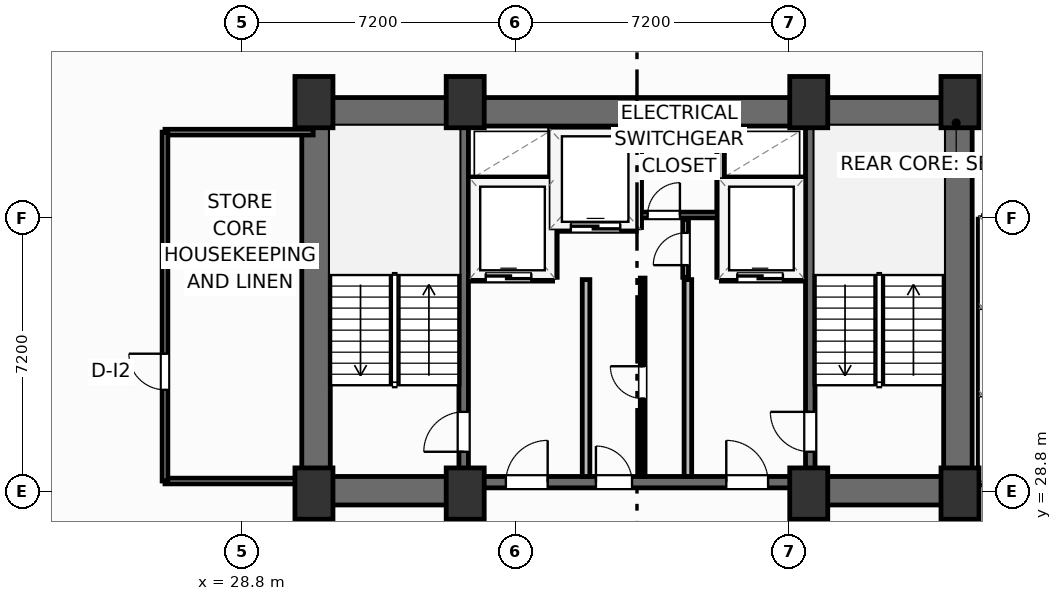
"""IFC4 building model, lengths in metres.
Left out: names, types, materials, properties, quantities, classifications, styles, units other than length and angle.
Written with IfcOpenShell. Run it as: python <this file> out.ifc"""

import sys

from ifc_helpers import new_model, si_unit, direction, frame, frame_2d, origin, origin_2d, place, context, subcontext, project, spatial, rectangle, extrude, element, fill, save


model = new_model("IFC4")
c1 = context("Model", 3, precision=1e-05, world=origin(), true_north=direction((0.0, 1.0)))
c2 = subcontext(c1, "Body", "Model", "MODEL_VIEW")
j1 = project(units=[si_unit("LENGTHUNIT", "METRE"), si_unit("PLANEANGLEUNIT", "RADIAN")], contexts=[c1])
p1 = place(None, origin())
s1 = spatial("IfcSite", under=j1, at=p1, CompositionType="ELEMENT")
p2 = place(p1, origin())
s2 = spatial("IfcBuilding", under=s1, at=p2, CompositionType="ELEMENT")
p3 = place(p2, frame((0.0, 0.0, 136.5)))
s3 = spatial("IfcBuildingStorey", under=s2, at=p3, CompositionType="ELEMENT", Elevation=136.5)
for number, where, z_axis, x_axis in (
    (1, (30.7, 28.75, 0.0), (0.0, 0.0, 1.0), (1.0, 0.0, 0.0)),
    (2, (34.68, 28.75, 0.0), (0.0, 0.0, 1.0), (1.0, 0.0, 0.0)),
    (3, (43.72, 28.75, 0.0), (0.0, 0.0, 1.0), (1.0, 0.0, 0.0)),
    (4, (47.7, 28.75, 0.0), (0.0, 0.0, 1.0), (1.0, 0.0, 0.0)),
    (5, (30.7, 39.05, 0.0), (0.0, 0.0, 1.0), (1.0, 0.0, 0.0)),
    (6, (34.68, 39.05, 0.0), (0.0, 0.0, 1.0), (1.0, 0.0, 0.0)),
    (7, (43.72, 39.05, 0.0), (0.0, 0.0, 1.0), (1.0, 0.0, 0.0)),
    (8, (47.7, 39.05, 0.0), (0.0, 0.0, 1.0), (1.0, 0.0, 0.0)),
):
    element("IfcColumn", number, at=place(p3, frame(where, z_axis=z_axis, x_axis=x_axis)), inside=s3, PredefinedType="COLUMN", context=c2, shape_type="SweptSolid", body=[
        extrude(rectangle(XDim=1.0, YDim=1.35, at=origin_2d()), origin(), (0.0, 0.0, 1.0), 3.7),
    ])
p4 = place(p3, frame((30.38, 38.795, 0.0), z_axis=(0.0, 0.0, 1.0), x_axis=(1.0, 0.0, 0.0)))
e9 = element("IfcWall", 9, at=p4, inside=s3, PredefinedType="SHEAR", context=c2, shape_type="SweptSolid", body=[
    extrude(rectangle(XDim=17.64, YDim=0.75, at=frame_2d((8.82, 0.0))), origin(), (0.0, 0.0, 1.0), 3.45),
])
for number, where, z_axis, x_axis in (
    (10, (30.755, 29.2, 0.0), (0.0, 0.0, 1.0), (0.0, 1.0, 0.0)),
    (11, (47.645, 29.2, 0.0), (0.0, 0.0, 1.0), (0.0, 1.0, 0.0)),
):
    element("IfcWall", number, at=place(p3, frame(where, z_axis=z_axis, x_axis=x_axis)), inside=s3, PredefinedType="SHEAR", context=c2, shape_type="SweptSolid", body=[
        extrude(rectangle(XDim=9.22, YDim=0.75, at=frame_2d((4.61, 0.0))), origin(), (0.0, 0.0, 1.0), 3.45),
    ])
p5 = place(p3, frame((30.38, 28.825, 0.0), z_axis=(0.0, 0.0, 1.0), x_axis=(1.0, 0.0, 0.0)))
e12 = element("IfcWall", 12, at=p5, inside=s3, PredefinedType="SHEAR", context=c2, shape_type="SweptSolid", body=[
    extrude(rectangle(XDim=4.42, YDim=0.75, at=frame_2d((2.21, 0.0))), origin(), (0.0, 0.0, 1.0), 3.45),
])
p6 = place(p3, frame((43.6, 28.825, 0.0), z_axis=(0.0, 0.0, 1.0), x_axis=(1.0, 0.0, 0.0)))
e13 = element("IfcWall", 13, at=p6, inside=s3, PredefinedType="SHEAR", context=c2, shape_type="SweptSolid", body=[
    extrude(rectangle(XDim=4.42, YDim=0.75, at=frame_2d((2.21, 0.0))), origin(), (0.0, 0.0, 1.0), 3.45),
])
p7 = place(p3, frame((34.8, 29.05, 0.0), z_axis=(0.0, 0.0, 1.0), x_axis=(1.0, 0.0, 0.0)))
e14 = element("IfcWall", 14, at=p7, inside=s3, PredefinedType="SHEAR", context=c2, shape_type="SweptSolid", body=[
    extrude(rectangle(XDim=8.8, YDim=0.3, at=frame_2d((4.4, 0.0))), origin(), (0.0, 0.0, 1.0), 3.45),
])
p8 = place(p7, frame((0.95, 0.0, 0.0)))
e15 = element("IfcOpeningElement", 15, at=p8, cuts=e14, PredefinedType="OPENING", context=c2, shape_type="SweptSolid", body=[
    extrude(rectangle(XDim=1.1, YDim=2.15, at=frame_2d((0.55, 1.075))), frame((0.0, 0.16, 0.0), z_axis=(0.0, -1.0, 0.0), x_axis=(1.0, 0.0, 0.0)), (0.0, 0.0, 1.0), 0.32),
])
p9 = place(p7, frame((6.75, 0.0, 0.0)))
e16 = element("IfcOpeningElement", 16, at=p9, cuts=e14, PredefinedType="OPENING", context=c2, shape_type="SweptSolid", body=[
    extrude(rectangle(XDim=1.1, YDim=2.15, at=frame_2d((0.55, 1.075))), frame((0.0, 0.16, 0.0), z_axis=(0.0, -1.0, 0.0), x_axis=(1.0, 0.0, 0.0)), (0.0, 0.0, 1.0), 0.32),
])
p10 = place(p7, frame((3.32, 0.0, 0.0)))
e17 = element("IfcOpeningElement", 17, at=p10, cuts=e14, PredefinedType="OPENING", context=c2, shape_type="SweptSolid", body=[
    extrude(rectangle(XDim=0.95, YDim=2.15, at=frame_2d((0.475, 1.075))), frame((0.0, 0.16, 0.0), z_axis=(0.0, -1.0, 0.0), x_axis=(1.0, 0.0, 0.0)), (0.0, 0.0, 1.0), 0.32),
])
p11 = place(p3, frame((34.64, 29.2, 0.0), z_axis=(0.0, 0.0, 1.0), x_axis=(0.0, 1.0, 0.0)))
e18 = element("IfcWall", 18, at=p11, inside=s3, PredefinedType="SHEAR", context=c2, shape_type="SweptSolid", body=[
    extrude(rectangle(XDim=9.22, YDim=0.25, at=frame_2d((4.61, 0.0))), origin(), (0.0, 0.0, 1.0), 3.45),
])
p12 = place(p11, frame((0.65, 0.0, 0.0)))
e19 = element("IfcOpeningElement", 19, at=p12, cuts=e18, PredefinedType="OPENING", context=c2, shape_type="SweptSolid", body=[
    extrude(rectangle(XDim=1.05, YDim=2.15, at=frame_2d((0.525, 1.075))), frame((0.0, 0.135, 0.0), z_axis=(0.0, -1.0, 0.0), x_axis=(1.0, 0.0, 0.0)), (0.0, 0.0, 1.0), 0.27),
])
p13 = place(p3, frame((43.76, 29.2, 0.0), z_axis=(0.0, 0.0, 1.0), x_axis=(0.0, 1.0, 0.0)))
e20 = element("IfcWall", 20, at=p13, inside=s3, PredefinedType="SHEAR", context=c2, shape_type="SweptSolid", body=[
    extrude(rectangle(XDim=9.22, YDim=0.25, at=frame_2d((4.61, 0.0))), origin(), (0.0, 0.0, 1.0), 3.45),
])
p14 = place(p13, frame((0.65, 0.0, 0.0)))
e21 = element("IfcOpeningElement", 21, at=p14, cuts=e20, PredefinedType="OPENING", context=c2, shape_type="SweptSolid", body=[
    extrude(rectangle(XDim=1.05, YDim=2.15, at=frame_2d((0.525, 1.075))), frame((0.0, 0.135, 0.0), z_axis=(0.0, -1.0, 0.0), x_axis=(1.0, 0.0, 0.0)), (0.0, 0.0, 1.0), 0.27),
])
for number, where, z_axis, x_axis in (
    (22, (37.86, 29.2, 0.0), (0.0, 0.0, 1.0), (0.0, 1.0, 0.0)),
    (23, (40.54, 29.2, 0.0), (0.0, 0.0, 1.0), (0.0, 1.0, 0.0)),
):
    element("IfcWall", number, at=place(p3, frame(where, z_axis=z_axis, x_axis=x_axis)), inside=s3, PredefinedType="PARTITIONING", context=c2, shape_type="SweptSolid", body=[
        extrude(rectangle(XDim=5.18, YDim=0.2, at=frame_2d((2.59, 0.0))), origin(), (0.0, 0.0, 1.0), 3.45),
    ])
p15 = place(p3, frame((34.8, 34.44, 0.0), z_axis=(0.0, 0.0, 1.0), x_axis=(1.0, 0.0, 0.0)))
e24 = element("IfcWall", 24, at=p15, inside=s3, PredefinedType="PARTITIONING", context=c2, shape_type="SweptSolid", body=[
    extrude(rectangle(XDim=2.18, YDim=0.2, at=frame_2d((1.09, 0.0))), origin(), (0.0, 0.0, 1.0), 3.45),
])
p16 = place(p15, frame((0.42, 0.0, 0.0)))
e25 = element("IfcOpeningElement", 25, at=p16, cuts=e24, PredefinedType="OPENING", context=c2, shape_type="SweptSolid", body=[
    extrude(rectangle(XDim=1.2, YDim=2.2, at=frame_2d((0.6, 1.1))), frame((0.0, 0.11, 0.0), z_axis=(0.0, -1.0, 0.0), x_axis=(1.0, 0.0, 0.0)), (0.0, 0.0, 1.0), 0.22),
])
p17 = place(p3, frame((34.8, 36.98, 0.0), z_axis=(0.0, 0.0, 1.0), x_axis=(1.0, 0.0, 0.0)))
e26 = element("IfcWall", 26, at=p17, inside=s3, PredefinedType="PARTITIONING", context=c2, shape_type="SweptSolid", body=[
    extrude(rectangle(XDim=2.18, YDim=0.2, at=frame_2d((1.09, 0.0))), origin(), (0.0, 0.0, 1.0), 3.45),
])
p18 = place(p3, frame((37.0, 34.44, 0.0), z_axis=(0.0, 0.0, 1.0), x_axis=(0.0, 1.0, 0.0)))
e27 = element("IfcWall", 27, at=p18, inside=s3, PredefinedType="PARTITIONING", context=c2, shape_type="SweptSolid", body=[
    extrude(rectangle(XDim=3.9, YDim=0.2, at=frame_2d((1.95, 0.0))), origin(), (0.0, 0.0, 1.0), 3.45),
])
p19 = place(p3, frame((41.42, 34.44, 0.0), z_axis=(0.0, 0.0, 1.0), x_axis=(1.0, 0.0, 0.0)))
e28 = element("IfcWall", 28, at=p19, inside=s3, PredefinedType="PARTITIONING", context=c2, shape_type="SweptSolid", body=[
    extrude(rectangle(XDim=2.18, YDim=0.2, at=frame_2d((1.09, 0.0))), origin(), (0.0, 0.0, 1.0), 3.45),
])
p20 = place(p19, frame((0.42, 0.0, 0.0)))
e29 = element("IfcOpeningElement", 29, at=p20, cuts=e28, PredefinedType="OPENING", context=c2, shape_type="SweptSolid", body=[
    extrude(rectangle(XDim=1.2, YDim=2.2, at=frame_2d((0.6, 1.1))), frame((0.0, 0.11, 0.0), z_axis=(0.0, -1.0, 0.0), x_axis=(1.0, 0.0, 0.0)), (0.0, 0.0, 1.0), 0.22),
])
p21 = place(p3, frame((41.42, 36.98, 0.0), z_axis=(0.0, 0.0, 1.0), x_axis=(1.0, 0.0, 0.0)))
e30 = element("IfcWall", 30, at=p21, inside=s3, PredefinedType="PARTITIONING", context=c2, shape_type="SweptSolid", body=[
    extrude(rectangle(XDim=2.18, YDim=0.2, at=frame_2d((1.09, 0.0))), origin(), (0.0, 0.0, 1.0), 3.45),
])
p22 = place(p3, frame((41.4, 34.44, 0.0), z_axis=(0.0, 0.0, 1.0), x_axis=(0.0, 1.0, 0.0)))
e31 = element("IfcWall", 31, at=p22, inside=s3, PredefinedType="PARTITIONING", context=c2, shape_type="SweptSolid", body=[
    extrude(rectangle(XDim=3.9, YDim=0.2, at=frame_2d((1.95, 0.0))), origin(), (0.0, 0.0, 1.0), 3.45),
])
p23 = place(p3, frame((37.06, 35.75, 0.0), z_axis=(0.0, 0.0, 1.0), x_axis=(1.0, 0.0, 0.0)))
e32 = element("IfcWall", 32, at=p23, inside=s3, PredefinedType="PARTITIONING", context=c2, shape_type="SweptSolid", body=[
    extrude(rectangle(XDim=2.12, YDim=0.2, at=frame_2d((1.06, 0.0))), origin(), (0.0, 0.0, 1.0), 3.45),
])
p24 = place(p23, frame((0.4, 0.0, 0.0)))
e33 = element("IfcOpeningElement", 33, at=p24, cuts=e32, PredefinedType="OPENING", context=c2, shape_type="SweptSolid", body=[
    extrude(rectangle(XDim=1.3, YDim=2.2, at=frame_2d((0.65, 1.1))), frame((0.0, 0.11, 0.0), z_axis=(0.0, -1.0, 0.0), x_axis=(1.0, 0.0, 0.0)), (0.0, 0.0, 1.0), 0.22),
])
p25 = place(p3, frame((39.22, 35.75, 0.0), z_axis=(0.0, 0.0, 1.0), x_axis=(0.0, 1.0, 0.0)))
e34 = element("IfcWall", 34, at=p25, inside=s3, PredefinedType="PARTITIONING", context=c2, shape_type="SweptSolid", body=[
    extrude(rectangle(XDim=2.59, YDim=0.2, at=frame_2d((1.295, 0.0))), origin(), (0.0, 0.0, 1.0), 3.45),
])
p26 = place(p3, frame((39.3, 36.08, 0.0), z_axis=(0.0, 0.0, 1.0), x_axis=(1.0, 0.0, 0.0)))
e35 = element("IfcWall", 35, at=p26, inside=s3, PredefinedType="PARTITIONING", context=c2, shape_type="SweptSolid", body=[
    extrude(rectangle(XDim=2.02, YDim=0.15, at=frame_2d((1.01, 0.0))), origin(), (0.0, 0.0, 1.0), 3.45),
])
p27 = place(p26, frame((0.18, 0.0, 0.0)))
e36 = element("IfcOpeningElement", 36, at=p27, cuts=e35, PredefinedType="OPENING", context=c2, shape_type="SweptSolid", body=[
    extrude(rectangle(XDim=0.85, YDim=2.05, at=frame_2d((0.425, 1.025))), frame((0.0, 0.085, 0.0), z_axis=(0.0, -1.0, 0.0), x_axis=(1.0, 0.0, 0.0)), (0.0, 0.0, 1.0), 0.17),
])
p28 = place(p3, frame((40.48, 34.44, 0.0), z_axis=(0.0, 0.0, 1.0), x_axis=(0.0, 1.0, 0.0)))
e37 = element("IfcWall", 37, at=p28, inside=s3, PredefinedType="PARTITIONING", context=c2, shape_type="SweptSolid", body=[
    extrude(rectangle(XDim=1.52, YDim=0.15, at=frame_2d((0.76, 0.0))), origin(), (0.0, 0.0, 1.0), 3.45),
])
p29 = place(p28, frame((0.32, 0.0, 0.0)))
e38 = element("IfcOpeningElement", 38, at=p29, cuts=e37, PredefinedType="OPENING", context=c2, shape_type="SweptSolid", body=[
    extrude(rectangle(XDim=0.85, YDim=2.05, at=frame_2d((0.425, 1.025))), frame((0.0, 0.085, 0.0), z_axis=(0.0, -1.0, 0.0), x_axis=(1.0, 0.0, 0.0)), (0.0, 0.0, 1.0), 0.17),
])
p30 = place(p3, frame((39.35, 29.2, 0.0), z_axis=(0.0, 0.0, 1.0), x_axis=(0.0, 1.0, 0.0)))
e39 = element("IfcWall", 39, at=p30, inside=s3, PredefinedType="PARTITIONING", context=c2, shape_type="SweptSolid", body=[
    extrude(rectangle(XDim=5.22, YDim=0.125, at=frame_2d((2.61, 0.0))), origin(), (0.0, 0.0, 1.0), 3.45),
])
p31 = place(p30, frame((2.05, 0.0, 0.0)))
e40 = element("IfcOpeningElement", 40, at=p31, cuts=e39, PredefinedType="OPENING", context=c2, shape_type="SweptSolid", body=[
    extrude(rectangle(XDim=0.85, YDim=2.05, at=frame_2d((0.425, 1.025))), frame((0.0, 0.073, 0.0), z_axis=(0.0, -1.0, 0.0), x_axis=(1.0, 0.0, 0.0)), (0.0, 0.0, 1.0), 0.145),
])
p32 = place(p3, frame((26.78, 29.08, 0.0), z_axis=(0.0, 0.0, 1.0), x_axis=(1.0, 0.0, 0.0)))
e41 = element("IfcWall", 41, at=p32, inside=s3, PredefinedType="PARTITIONING", context=c2, shape_type="SweptSolid", body=[
    extrude(rectangle(XDim=3.6, YDim=0.15, at=frame_2d((1.8, 0.0))), origin(), (0.0, 0.0, 1.0), 3.45),
])
p33 = place(p3, frame((26.78, 38.26, 0.0), z_axis=(0.0, 0.0, 1.0), x_axis=(1.0, 0.0, 0.0)))
e42 = element("IfcWall", 42, at=p33, inside=s3, PredefinedType="PARTITIONING", context=c2, shape_type="SweptSolid", body=[
    extrude(rectangle(XDim=3.9, YDim=0.15, at=frame_2d((1.95, 0.0))), origin(), (0.0, 0.0, 1.0), 3.45),
])
p34 = place(p3, frame((26.78, 29.08, 0.0), z_axis=(0.0, 0.0, 1.0), x_axis=(0.0, 1.0, 0.0)))
e43 = element("IfcWall", 43, at=p34, inside=s3, PredefinedType="PARTITIONING", context=c2, shape_type="SweptSolid", body=[
    extrude(rectangle(XDim=9.18, YDim=0.15, at=frame_2d((4.59, 0.0))), origin(), (0.0, 0.0, 1.0), 3.45),
])
p35 = place(p34, frame((2.4, 0.0, 0.0)))
e44 = element("IfcOpeningElement", 44, at=p35, cuts=e43, PredefinedType="OPENING", context=c2, shape_type="SweptSolid", body=[
    extrude(rectangle(XDim=0.95, YDim=2.05, at=frame_2d((0.475, 1.025))), frame((0.0, 0.085, 0.0), z_axis=(0.0, -1.0, 0.0), x_axis=(1.0, 0.0, 0.0)), (0.0, 0.0, 1.0), 0.17),
])
p36 = place(p3, frame((48.28, 29.08, 0.0), z_axis=(0.0, 0.0, 1.0), x_axis=(0.0, 1.0, 0.0)))
e45 = element("IfcWall", 45, at=p36, inside=s3, PredefinedType="PARTITIONING", context=c2, shape_type="SweptSolid", body=[
    extrude(rectangle(XDim=6.89, YDim=0.2, at=frame_2d((3.445, 0.0))), origin(), (0.0, 0.0, 1.0), 3.45),
])
p37 = place(p12, origin())
e46 = element("IfcDoor", 46, at=p37, inside=s3, OperationType="SINGLE_SWING_LEFT", PredefinedType="DOOR", context=c2, shape_type="SweptSolid", body=[
    extrude(rectangle(XDim=1.05, YDim=2.15, at=frame_2d((0.525, 1.075))), frame((0.0, 0.025, 0.0), z_axis=(0.0, -1.0, 0.0), x_axis=(1.0, 0.0, 0.0)), (0.0, 0.0, 1.0), 0.05),
])
fill(e19, e46)
p38 = place(p14, origin())
e47 = element("IfcDoor", 47, at=p38, inside=s3, OperationType="SINGLE_SWING_RIGHT", PredefinedType="DOOR", context=c2, shape_type="SweptSolid", body=[
    extrude(rectangle(XDim=1.05, YDim=2.15, at=frame_2d((0.525, 1.075))), frame((0.0, 0.025, 0.0), z_axis=(0.0, -1.0, 0.0), x_axis=(1.0, 0.0, 0.0)), (0.0, 0.0, 1.0), 0.05),
])
fill(e21, e47)
p39 = place(p8, origin())
e48 = element("IfcDoor", 48, at=p39, inside=s3, OperationType="SINGLE_SWING_RIGHT", PredefinedType="DOOR", context=c2, shape_type="SweptSolid", body=[
    extrude(rectangle(XDim=1.1, YDim=2.15, at=frame_2d((0.55, 1.075))), frame((0.0, 0.025, 0.0), z_axis=(0.0, -1.0, 0.0), x_axis=(1.0, 0.0, 0.0)), (0.0, 0.0, 1.0), 0.05),
])
fill(e15, e48)
p40 = place(p9, origin())
e49 = element("IfcDoor", 49, at=p40, inside=s3, OperationType="SINGLE_SWING_LEFT", PredefinedType="DOOR", context=c2, shape_type="SweptSolid", body=[
    extrude(rectangle(XDim=1.1, YDim=2.15, at=frame_2d((0.55, 1.075))), frame((0.0, 0.025, 0.0), z_axis=(0.0, -1.0, 0.0), x_axis=(1.0, 0.0, 0.0)), (0.0, 0.0, 1.0), 0.05),
])
fill(e16, e49)
p41 = place(p16, origin())
e50 = element("IfcDoor", 50, at=p41, inside=s3, OperationType="SLIDING_TO_LEFT", PredefinedType="DOOR", context=c2, shape_type="SweptSolid", body=[
    extrude(rectangle(XDim=1.2, YDim=2.2, at=frame_2d((0.6, 1.1))), frame((0.0, 0.025, 0.0), z_axis=(0.0, -1.0, 0.0), x_axis=(1.0, 0.0, 0.0)), (0.0, 0.0, 1.0), 0.05),
])
fill(e25, e50)
p42 = place(p20, origin())
e51 = element("IfcDoor", 51, at=p42, inside=s3, OperationType="SLIDING_TO_LEFT", PredefinedType="DOOR", context=c2, shape_type="SweptSolid", body=[
    extrude(rectangle(XDim=1.2, YDim=2.2, at=frame_2d((0.6, 1.1))), frame((0.0, 0.025, 0.0), z_axis=(0.0, -1.0, 0.0), x_axis=(1.0, 0.0, 0.0)), (0.0, 0.0, 1.0), 0.05),
])
fill(e29, e51)
p43 = place(p24, origin())
e52 = element("IfcDoor", 52, at=p43, inside=s3, OperationType="SLIDING_TO_LEFT", PredefinedType="DOOR", context=c2, shape_type="SweptSolid", body=[
    extrude(rectangle(XDim=1.3, YDim=2.2, at=frame_2d((0.65, 1.1))), frame((0.0, 0.025, 0.0), z_axis=(0.0, -1.0, 0.0), x_axis=(1.0, 0.0, 0.0)), (0.0, 0.0, 1.0), 0.05),
])
fill(e33, e52)
p44 = place(p27, origin())
e53 = element("IfcDoor", 53, at=p44, inside=s3, OperationType="SINGLE_SWING_RIGHT", PredefinedType="DOOR", context=c2, shape_type="SweptSolid", body=[
    extrude(rectangle(XDim=0.85, YDim=2.05, at=frame_2d((0.425, 1.025))), frame((0.0, 0.025, 0.0), z_axis=(0.0, -1.0, 0.0), x_axis=(1.0, 0.0, 0.0)), (0.0, 0.0, 1.0), 0.05),
])
fill(e36, e53)
p45 = place(p29, origin())
e54 = element("IfcDoor", 54, at=p45, inside=s3, OperationType="SINGLE_SWING_LEFT", PredefinedType="DOOR", context=c2, shape_type="SweptSolid", body=[
    extrude(rectangle(XDim=0.85, YDim=2.05, at=frame_2d((0.425, 1.025))), frame((0.0, 0.025, 0.0), z_axis=(0.0, -1.0, 0.0), x_axis=(1.0, 0.0, 0.0)), (0.0, 0.0, 1.0), 0.05),
])
fill(e38, e54)
p46 = place(p31, origin())
e55 = element("IfcDoor", 55, at=p46, inside=s3, OperationType="SINGLE_SWING_RIGHT", PredefinedType="DOOR", context=c2, shape_type="SweptSolid", body=[
    extrude(rectangle(XDim=0.85, YDim=2.05, at=frame_2d((0.425, 1.025))), frame((0.0, 0.025, 0.0), z_axis=(0.0, -1.0, 0.0), x_axis=(1.0, 0.0, 0.0)), (0.0, 0.0, 1.0), 0.05),
])
fill(e40, e55)
p47 = place(p10, origin())
e56 = element("IfcDoor", 56, at=p47, inside=s3, OperationType="SINGLE_SWING_LEFT", PredefinedType="DOOR", context=c2, shape_type="SweptSolid", body=[
    extrude(rectangle(XDim=0.95, YDim=2.15, at=frame_2d((0.475, 1.075))), frame((0.0, 0.025, 0.0), z_axis=(0.0, -1.0, 0.0), x_axis=(1.0, 0.0, 0.0)), (0.0, 0.0, 1.0), 0.05),
])
fill(e17, e56)
p48 = place(p35, origin())
e57 = element("IfcDoor", 57, at=p48, inside=s3, OperationType="SINGLE_SWING_RIGHT", PredefinedType="DOOR", context=c2, shape_type="SweptSolid", body=[
    extrude(rectangle(XDim=0.95, YDim=2.05, at=frame_2d((0.475, 1.025))), frame((0.0, 0.025, 0.0), z_axis=(0.0, -1.0, 0.0), x_axis=(1.0, 0.0, 0.0)), (0.0, 0.0, 1.0), 0.05),
])
fill(e44, e57)
save(model, sys.argv[1])
